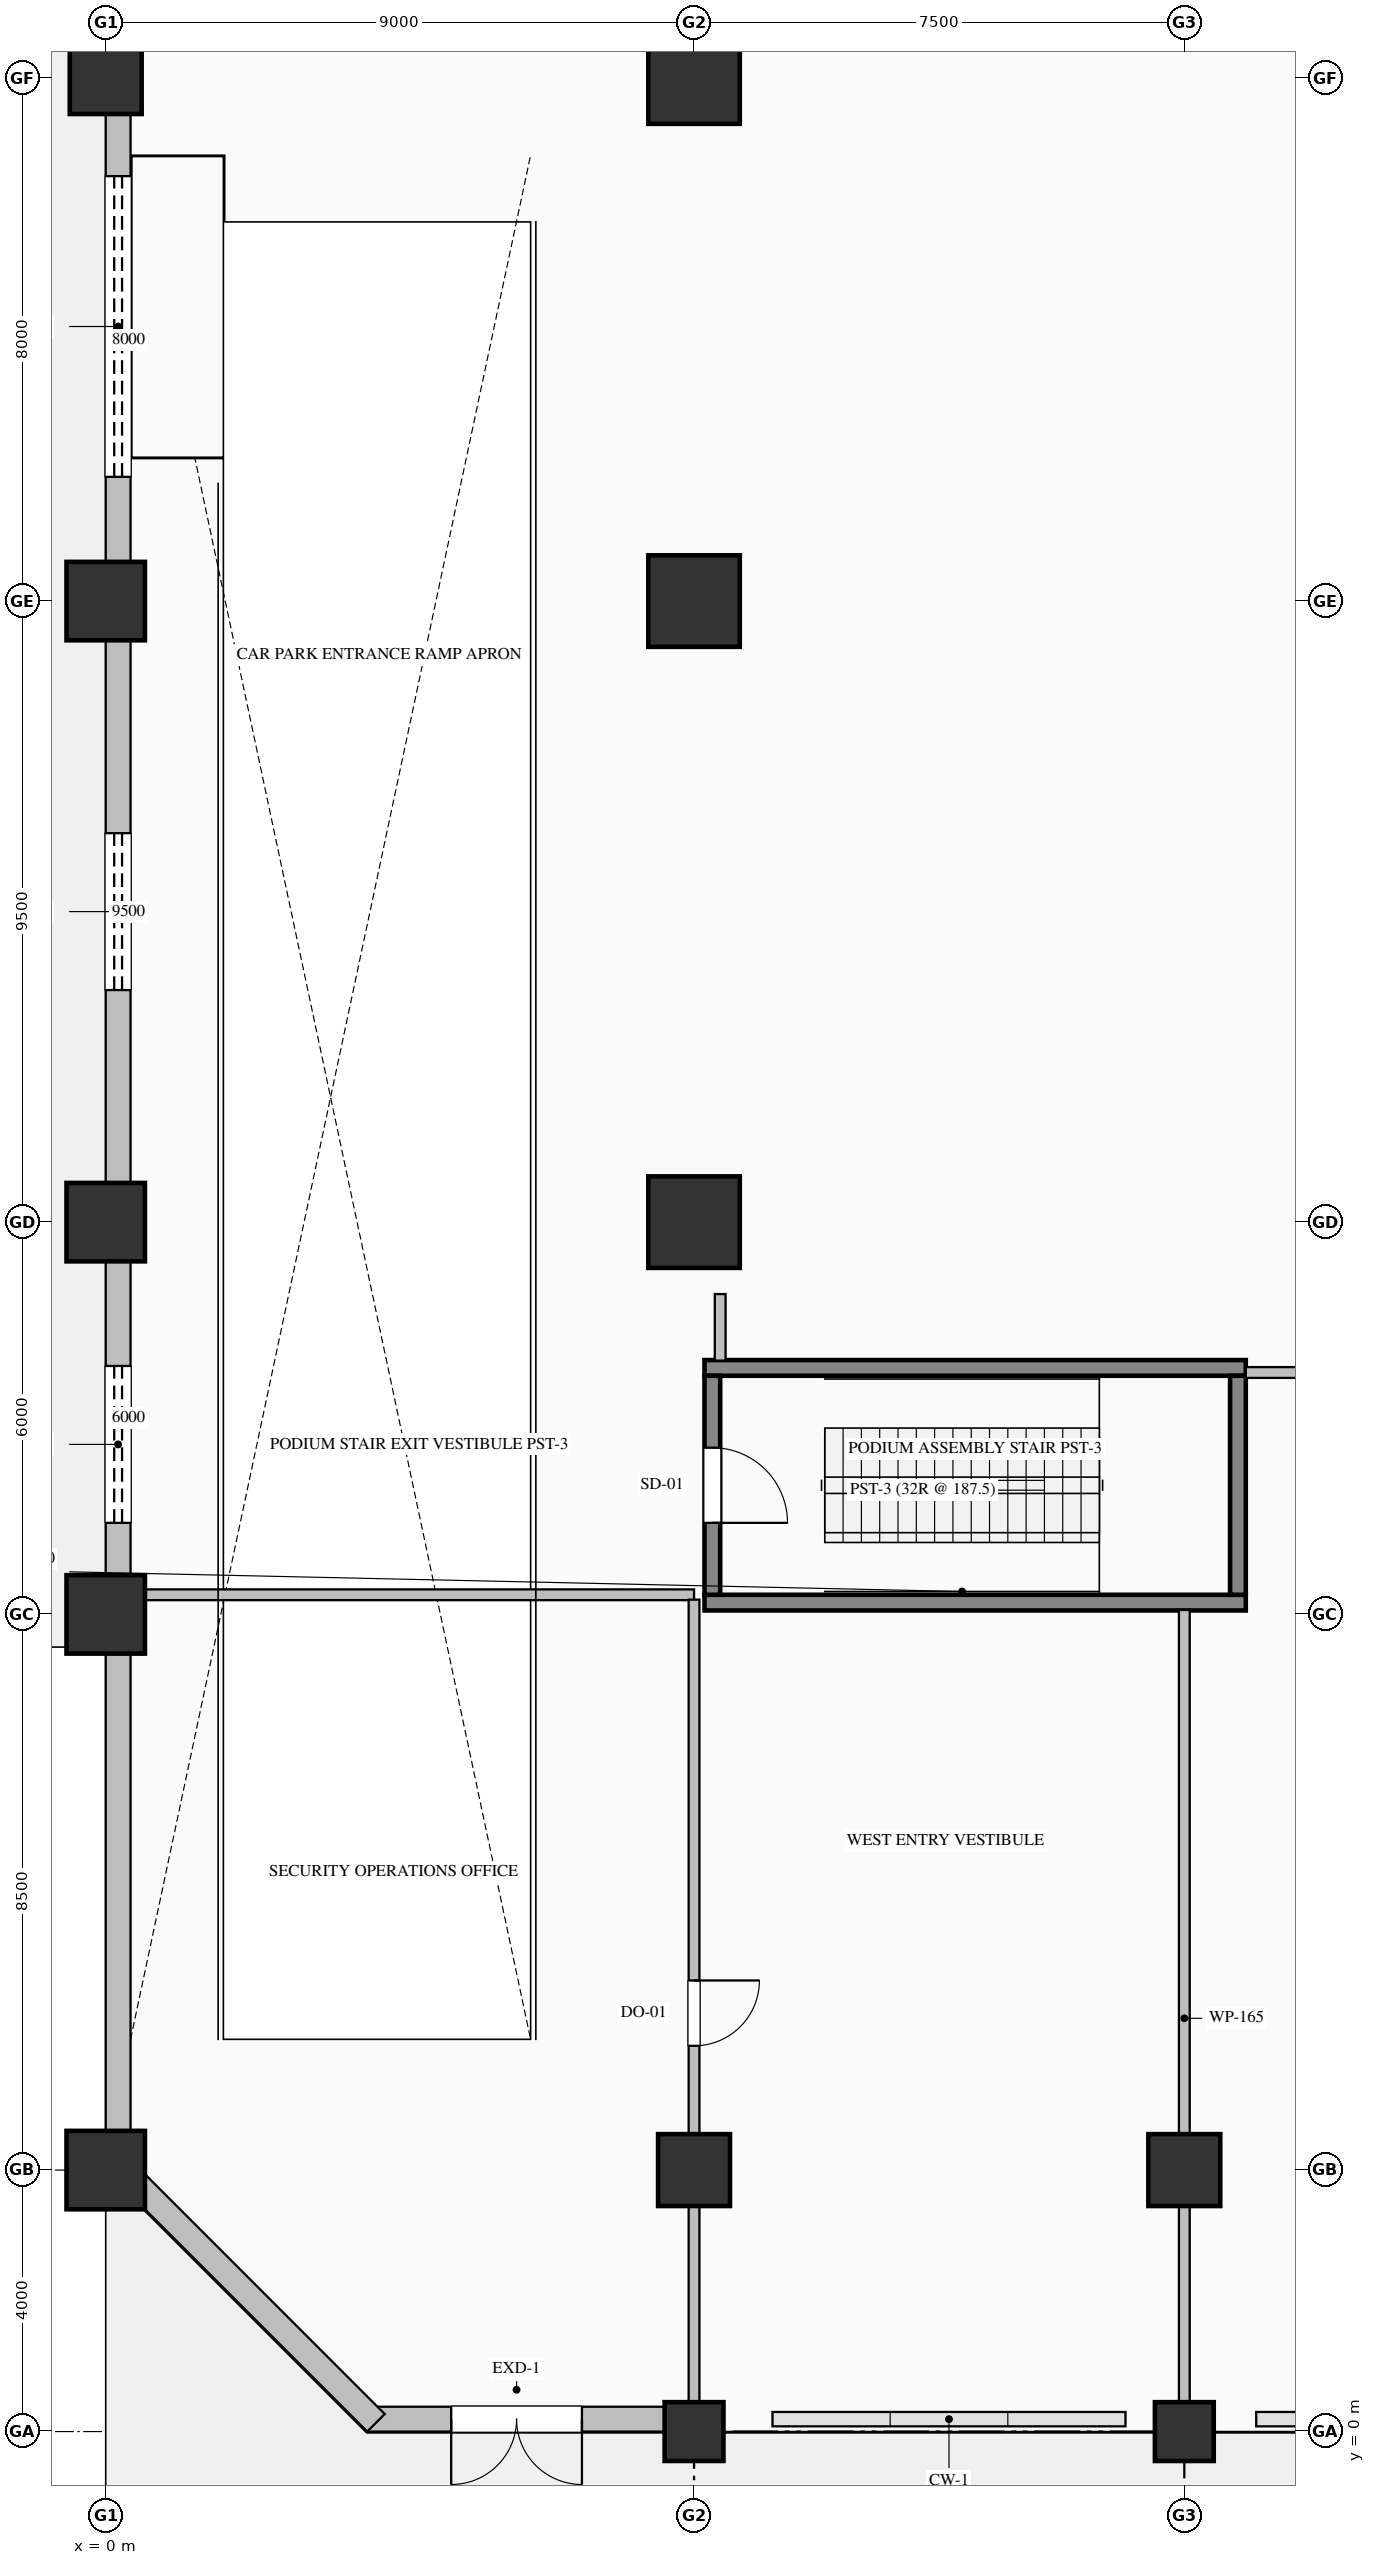
"""IFC4 building model, lengths in metres.
Left out: names, types, materials, properties, quantities, classifications, styles, units other than length and angle.
Written with IfcOpenShell. Run it as: python <this file> out.ifc"""

import sys

from ifc_helpers import new_model, si_unit, direction, frame, frame_2d, origin, origin_2d, place, context, subcontext, project, spatial, rectangle, hollow_rectangle, hollow_circle, extrude, element, fill, save


model = new_model("IFC4")
c1 = context("Model", 3, precision=1e-05, world=origin(), true_north=direction((0.0, 1.0)))
c2 = subcontext(c1, "Body", "Model", "MODEL_VIEW")
j1 = project(units=[si_unit("LENGTHUNIT", "METRE"), si_unit("PLANEANGLEUNIT", "RADIAN")], contexts=[c1])
p1 = place(None, origin())
s1 = spatial("IfcSite", under=j1, at=p1, CompositionType="ELEMENT")
p2 = place(p1, origin())
s2 = spatial("IfcBuilding", under=s1, at=p2, CompositionType="ELEMENT")
p3 = place(p2, origin())
s3 = spatial("IfcBuildingStorey", under=s2, at=p3, CompositionType="ELEMENT", Elevation=0.0)
for number, where, z_axis, x_axis in (
    (1, (0.0, 4.0, 0.0), (0.0, 0.0, 1.0), (1.0, 0.0, 0.0)),
    (2, (0.0, 12.5, 0.0), (0.0, 0.0, 1.0), (1.0, 0.0, 0.0)),
    (3, (0.0, 18.5, 0.0), (0.0, 0.0, 1.0), (1.0, 0.0, 0.0)),
    (4, (0.0, 28.0, 0.0), (0.0, 0.0, 1.0), (1.0, 0.0, 0.0)),
):
    element("IfcColumn", number, at=place(p3, frame(where, z_axis=z_axis, x_axis=x_axis)), inside=s3, PredefinedType="COLUMN", context=c2, shape_type="SweptSolid", body=[
        extrude(hollow_circle(Radius=0.6, WallThickness=0.04, at=origin_2d()), origin(), (0.0, 0.0, 1.0), 6.0),
    ])
p4 = place(p3, frame((0.0, 36.0, 0.0), z_axis=(0.0, 0.0, 1.0), x_axis=(1.0, 0.0, 0.0)))
e5 = element("IfcColumn", 5, at=p4, inside=s3, PredefinedType="COLUMN", context=c2, shape_type="SweptSolid", body=[
    extrude(hollow_rectangle(XDim=1.1, YDim=1.1, WallThickness=0.04, at=origin_2d()), origin(), (0.0, 0.0, 1.0), 6.0),
])
p5 = place(p3, frame((9.0, 0.0, 0.0), z_axis=(0.0, 0.0, 1.0), x_axis=(1.0, 0.0, 0.0)))
e6 = element("IfcColumn", 6, at=p5, inside=s3, PredefinedType="PILASTER", context=c2, shape_type="SweptSolid", body=[
    extrude(rectangle(XDim=0.9, YDim=0.9, at=origin_2d()), origin(), (0.0, 0.0, 1.0), 6.0),
])
p6 = place(p3, frame((9.0, 4.0, 0.0), z_axis=(0.0, 0.0, 1.0), x_axis=(1.0, 0.0, 0.0)))
e7 = element("IfcColumn", 7, at=p6, inside=s3, PredefinedType="COLUMN", context=c2, shape_type="SweptSolid", body=[
    extrude(rectangle(XDim=1.1, YDim=1.1, at=origin_2d()), origin(), (0.0, 0.0, 1.0), 6.0),
])
for number, where, z_axis, x_axis in (
    (8, (9.0, 18.5, 0.0), (0.0, 0.0, 1.0), (1.0, 0.0, 0.0)),
    (9, (9.0, 28.0, 0.0), (0.0, 0.0, 1.0), (1.0, 0.0, 0.0)),
    (10, (9.0, 36.0, 0.0), (0.0, 0.0, 1.0), (1.0, 0.0, 0.0)),
):
    element("IfcColumn", number, at=place(p3, frame(where, z_axis=z_axis, x_axis=x_axis)), inside=s3, PredefinedType="COLUMN", context=c2, shape_type="SweptSolid", body=[
        extrude(hollow_rectangle(XDim=1.4, YDim=1.4, WallThickness=0.05, at=origin_2d()), origin(), (0.0, 0.0, 1.0), 6.0),
    ])
p7 = place(p3, frame((16.5, 0.0, 0.0), z_axis=(0.0, 0.0, 1.0), x_axis=(1.0, 0.0, 0.0)))
e11 = element("IfcColumn", 11, at=p7, inside=s3, PredefinedType="PILASTER", context=c2, shape_type="SweptSolid", body=[
    extrude(rectangle(XDim=0.9, YDim=0.9, at=origin_2d()), origin(), (0.0, 0.0, 1.0), 6.0),
])
p8 = place(p3, frame((16.5, 4.0, 0.0), z_axis=(0.0, 0.0, 1.0), x_axis=(1.0, 0.0, 0.0)))
e12 = element("IfcColumn", 12, at=p8, inside=s3, PredefinedType="COLUMN", context=c2, shape_type="SweptSolid", body=[
    extrude(rectangle(XDim=1.1, YDim=1.1, at=origin_2d()), origin(), (0.0, 0.0, 1.0), 6.0),
])
p9 = place(p3, frame((0.19, 4.0, 0.0), z_axis=(0.0, 0.0, 1.0), x_axis=(0.0, 1.0, 0.0)))
e13 = element("IfcWall", 13, at=p9, inside=s3, PredefinedType="SOLIDWALL", context=c2, shape_type="SweptSolid", body=[
    extrude(rectangle(XDim=44.0, YDim=0.38, at=frame_2d((22.0, 0.0))), origin(), (0.0, 0.0, 1.0), 5.22),
])
p10 = place(p9, frame((25.9, 0.0, 0.0)))
e14 = element("IfcOpeningElement", 14, at=p10, cuts=e13, PredefinedType="OPENING", context=c2, shape_type="SweptSolid", body=[
    extrude(rectangle(XDim=4.6, YDim=3.6, at=frame_2d((2.3, 1.8))), frame((0.0, 0.2, 0.0), z_axis=(0.0, -1.0, 0.0), x_axis=(1.0, 0.0, 0.0)), (0.0, 0.0, 1.0), 0.4),
])
p11 = place(p9, frame((33.9, 0.0, 0.0)))
e15 = element("IfcOpeningElement", 15, at=p11, cuts=e13, PredefinedType="OPENING", context=c2, shape_type="SweptSolid", body=[
    extrude(rectangle(XDim=4.2, YDim=4.2, at=frame_2d((2.1, 2.1))), frame((0.0, 0.2, 0.0), z_axis=(0.0, -1.0, 0.0), x_axis=(1.0, 0.0, 0.0)), (0.0, 0.0, 1.0), 0.4),
])
p12 = place(p9, frame((9.9, 0.0, 0.0)))
e16 = element("IfcOpeningElement", 16, at=p12, cuts=e13, PredefinedType="OPENING", context=c2, shape_type="SweptSolid", body=[
    extrude(rectangle(XDim=2.4, YDim=2.6, at=frame_2d((1.2, 1.3))), frame((0.0, 0.2, 0.0), z_axis=(0.0, -1.0, 0.0), x_axis=(1.0, 0.0, 0.0)), (0.0, 0.0, 1.0), 0.4),
])
p13 = place(p9, frame((18.05, 0.0, 0.0)))
e17 = element("IfcOpeningElement", 17, at=p13, cuts=e13, PredefinedType="OPENING", context=c2, shape_type="SweptSolid", body=[
    extrude(rectangle(XDim=2.4, YDim=2.6, at=frame_2d((1.2, 1.3))), frame((0.0, 0.2, 0.0), z_axis=(0.0, -1.0, 0.0), x_axis=(1.0, 0.0, 0.0)), (0.0, 0.0, 1.0), 0.4),
])
p14 = place(p3, frame((8.57, 0.19, 0.0), z_axis=(0.0, 0.0, 1.0), x_axis=(-1.0, 0.0, 0.0)))
e18 = element("IfcWall", 18, at=p14, inside=s3, PredefinedType="SOLIDWALL", context=c2, shape_type="SweptSolid", body=[
    extrude(rectangle(XDim=4.57, YDim=0.38, at=frame_2d((2.285, 0.0))), origin(), (0.0, 0.0, 1.0), 5.22),
])
p15 = place(p14, frame((1.285, 0.0, 0.0)))
e19 = element("IfcOpeningElement", 19, at=p15, cuts=e18, PredefinedType="OPENING", context=c2, shape_type="SweptSolid", body=[
    extrude(rectangle(XDim=2.0, YDim=2.4, at=frame_2d((1.0, 1.2))), frame((0.0, 0.2, 0.0), z_axis=(0.0, -1.0, 0.0), x_axis=(1.0, 0.0, 0.0)), (0.0, 0.0, 1.0), 0.4),
])
p16 = place(p3, frame((4.134, 0.134, 0.0), z_axis=(0.0, 0.0, 1.0), x_axis=(-0.707106781187, 0.707106781187, 0.0)))
e20 = element("IfcWall", 20, at=p16, inside=s3, PredefinedType="SOLIDWALL", context=c2, shape_type="SweptSolid", body=[
    extrude(rectangle(XDim=5.657, YDim=0.38, at=frame_2d((2.828, 0.0))), origin(), (0.0, 0.0, 1.0), 4.32),
])
for number, where, z_axis, x_axis in (
    (21, (9.16, 16.27, 0.0), (0.0, 0.0, 1.0), (1.0, 0.0, 0.0)),
    (22, (17.44, 12.68, 0.0), (0.0, 0.0, 1.0), (-1.0, 0.0, 0.0)),
):
    element("IfcWall", number, at=place(p3, frame(where, z_axis=z_axis, x_axis=x_axis)), inside=s3, PredefinedType="SOLIDWALL", context=c2, shape_type="SweptSolid", body=[
        extrude(rectangle(XDim=8.28, YDim=0.24, at=frame_2d((4.14, 0.0))), origin(), (0.0, 0.0, 1.0), 6.0),
    ])
p17 = place(p3, frame((9.28, 16.15, 0.0), z_axis=(0.0, 0.0, 1.0), x_axis=(0.0, -1.0, 0.0)))
e23 = element("IfcWall", 23, at=p17, inside=s3, PredefinedType="SOLIDWALL", context=c2, shape_type="SweptSolid", body=[
    extrude(rectangle(XDim=3.35, YDim=0.24, at=frame_2d((1.675, 0.0))), origin(), (0.0, 0.0, 1.0), 6.0),
])
p18 = place(p17, frame((1.1, 0.0, 0.0)))
e24 = element("IfcOpeningElement", 24, at=p18, cuts=e23, PredefinedType="OPENING", context=c2, shape_type="SweptSolid", body=[
    extrude(rectangle(XDim=1.15, YDim=2.2, at=frame_2d((0.575, 1.1))), frame((0.0, 0.13, 0.0), z_axis=(0.0, -1.0, 0.0), x_axis=(1.0, 0.0, 0.0)), (0.0, 0.0, 1.0), 0.26),
])
p19 = place(p3, frame((17.32, 12.8, 0.0), z_axis=(0.0, 0.0, 1.0), x_axis=(0.0, 1.0, 0.0)))
e25 = element("IfcWall", 25, at=p19, inside=s3, PredefinedType="SOLIDWALL", context=c2, shape_type="SweptSolid", body=[
    extrude(rectangle(XDim=3.35, YDim=0.24, at=frame_2d((1.675, 0.0))), origin(), (0.0, 0.0, 1.0), 6.0),
])
p20 = place(p3, frame((9.4, 17.4, 0.0), z_axis=(0.0, 0.0, 1.0), x_axis=(0.0, -1.0, 0.0)))
e26 = element("IfcWall", 26, at=p20, inside=s3, PredefinedType="PARTITIONING", context=c2, shape_type="SweptSolid", body=[
    extrude(rectangle(XDim=1.018, YDim=0.165, at=frame_2d((0.509, 0.0))), origin(), (0.0, 0.0, 1.0), 5.72),
])
p21 = place(p3, frame((9.0, 12.8, 0.0), z_axis=(0.0, 0.0, 1.0), x_axis=(-1.0, 0.0, 0.0)))
e27 = element("IfcWall", 27, at=p21, inside=s3, PredefinedType="PARTITIONING", context=c2, shape_type="SweptSolid", body=[
    extrude(rectangle(XDim=8.628, YDim=0.165, at=frame_2d((4.314, 0.0))), origin(), (0.0, 0.0, 1.0), 5.72),
])
p22 = place(p3, frame((40.5, 16.2, 0.0), z_axis=(0.0, 0.0, 1.0), x_axis=(-1.0, 0.0, 0.0)))
e28 = element("IfcWall", 28, at=p22, inside=s3, PredefinedType="PARTITIONING", context=c2, shape_type="SweptSolid", body=[
    extrude(rectangle(XDim=23.06, YDim=0.165, at=frame_2d((11.53, 0.0))), origin(), (0.0, 0.0, 1.0), 5.72),
])
p23 = place(p22, frame((10.53, 0.0, 0.0)))
e29 = element("IfcOpeningElement", 29, at=p23, cuts=e28, PredefinedType="OPENING", context=c2, shape_type="SweptSolid", body=[
    extrude(rectangle(XDim=2.0, YDim=2.4, at=frame_2d((1.0, 1.2))), frame((0.0, 0.093, 0.0), z_axis=(0.0, -1.0, 0.0), x_axis=(1.0, 0.0, 0.0)), (0.0, 0.0, 1.0), 0.185),
])
p24 = place(p3, frame((16.5, 0.075, 0.0), z_axis=(0.0, 0.0, 1.0), x_axis=(0.0, 1.0, 0.0)))
e30 = element("IfcWall", 30, at=p24, inside=s3, PredefinedType="PARTITIONING", context=c2, shape_type="SweptSolid", body=[
    extrude(rectangle(XDim=12.493, YDim=0.165, at=frame_2d((6.247, 0.0))), origin(), (0.0, 0.0, 1.0), 4.812),
])
p25 = place(p3, frame((9.0, 12.726, 0.0), z_axis=(0.0, 0.0, 1.0), x_axis=(0.0, -1.0, 0.0)))
e31 = element("IfcWall", 31, at=p25, inside=s3, PredefinedType="PARTITIONING", context=c2, shape_type="SweptSolid", body=[
    extrude(rectangle(XDim=12.651, YDim=0.165, at=frame_2d((6.325, 0.0))), origin(), (0.0, 0.0, 1.0), 4.812),
])
p26 = place(p25, frame((5.825, 0.0, 0.0)))
e32 = element("IfcOpeningElement", 32, at=p26, cuts=e31, PredefinedType="OPENING", context=c2, shape_type="SweptSolid", body=[
    extrude(rectangle(XDim=1.0, YDim=2.15, at=frame_2d((0.5, 1.075))), frame((0.0, 0.093, 0.0), z_axis=(0.0, -1.0, 0.0), x_axis=(1.0, 0.0, 0.0)), (0.0, 0.0, 1.0), 0.185),
])
p27 = place(p15, origin())
e33 = element("IfcDoor", 33, at=p27, inside=s3, OperationType="DOUBLE_DOOR_SINGLE_SWING", PredefinedType="DOOR", context=c2, shape_type="SweptSolid", body=[
    extrude(rectangle(XDim=2.0, YDim=2.4, at=frame_2d((1.0, 1.2))), frame((0.0, 0.025, 0.0), z_axis=(0.0, -1.0, 0.0), x_axis=(1.0, 0.0, 0.0)), (0.0, 0.0, 1.0), 0.05),
])
fill(e19, e33)
p28 = place(p10, origin())
e34 = element("IfcDoor", 34, at=p28, inside=s3, OperationType="ROLLINGUP", PredefinedType="GATE", context=c2, shape_type="SweptSolid", body=[
    extrude(rectangle(XDim=4.6, YDim=3.6, at=frame_2d((2.3, 1.8))), frame((0.0, 0.025, 0.0), z_axis=(0.0, -1.0, 0.0), x_axis=(1.0, 0.0, 0.0)), (0.0, 0.0, 1.0), 0.05),
])
fill(e14, e34)
p29 = place(p12, origin())
e35 = element("IfcDoor", 35, at=p29, inside=s3, OperationType="DOUBLE_DOOR_SINGLE_SWING", PredefinedType="GATE", context=c2, shape_type="SweptSolid", body=[
    extrude(rectangle(XDim=2.4, YDim=2.6, at=frame_2d((1.2, 1.3))), frame((0.0, 0.025, 0.0), z_axis=(0.0, -1.0, 0.0), x_axis=(1.0, 0.0, 0.0)), (0.0, 0.0, 1.0), 0.05),
])
fill(e16, e35)
p30 = place(p13, origin())
e36 = element("IfcDoor", 36, at=p30, inside=s3, OperationType="DOUBLE_DOOR_SINGLE_SWING", PredefinedType="GATE", context=c2, shape_type="SweptSolid", body=[
    extrude(rectangle(XDim=2.4, YDim=2.6, at=frame_2d((1.2, 1.3))), frame((0.0, 0.025, 0.0), z_axis=(0.0, -1.0, 0.0), x_axis=(1.0, 0.0, 0.0)), (0.0, 0.0, 1.0), 0.05),
])
fill(e17, e36)
p31 = place(p18, origin())
e37 = element("IfcDoor", 37, at=p31, inside=s3, OperationType="SINGLE_SWING_RIGHT", PredefinedType="DOOR", context=c2, shape_type="SweptSolid", body=[
    extrude(rectangle(XDim=1.15, YDim=2.2, at=frame_2d((0.575, 1.1))), frame((0.0, 0.025, 0.0), z_axis=(0.0, -1.0, 0.0), x_axis=(1.0, 0.0, 0.0)), (0.0, 0.0, 1.0), 0.05),
])
fill(e24, e37)
p32 = place(p26, origin())
e38 = element("IfcDoor", 38, at=p32, inside=s3, OperationType="SINGLE_SWING_LEFT", PredefinedType="DOOR", context=c2, shape_type="SweptSolid", body=[
    extrude(rectangle(XDim=1.0, YDim=2.15, at=frame_2d((0.5, 1.075))), frame((0.0, 0.025, 0.0), z_axis=(0.0, -1.0, 0.0), x_axis=(1.0, 0.0, 0.0)), (0.0, 0.0, 1.0), 0.05),
])
fill(e32, e38)
save(model, sys.argv[1])
